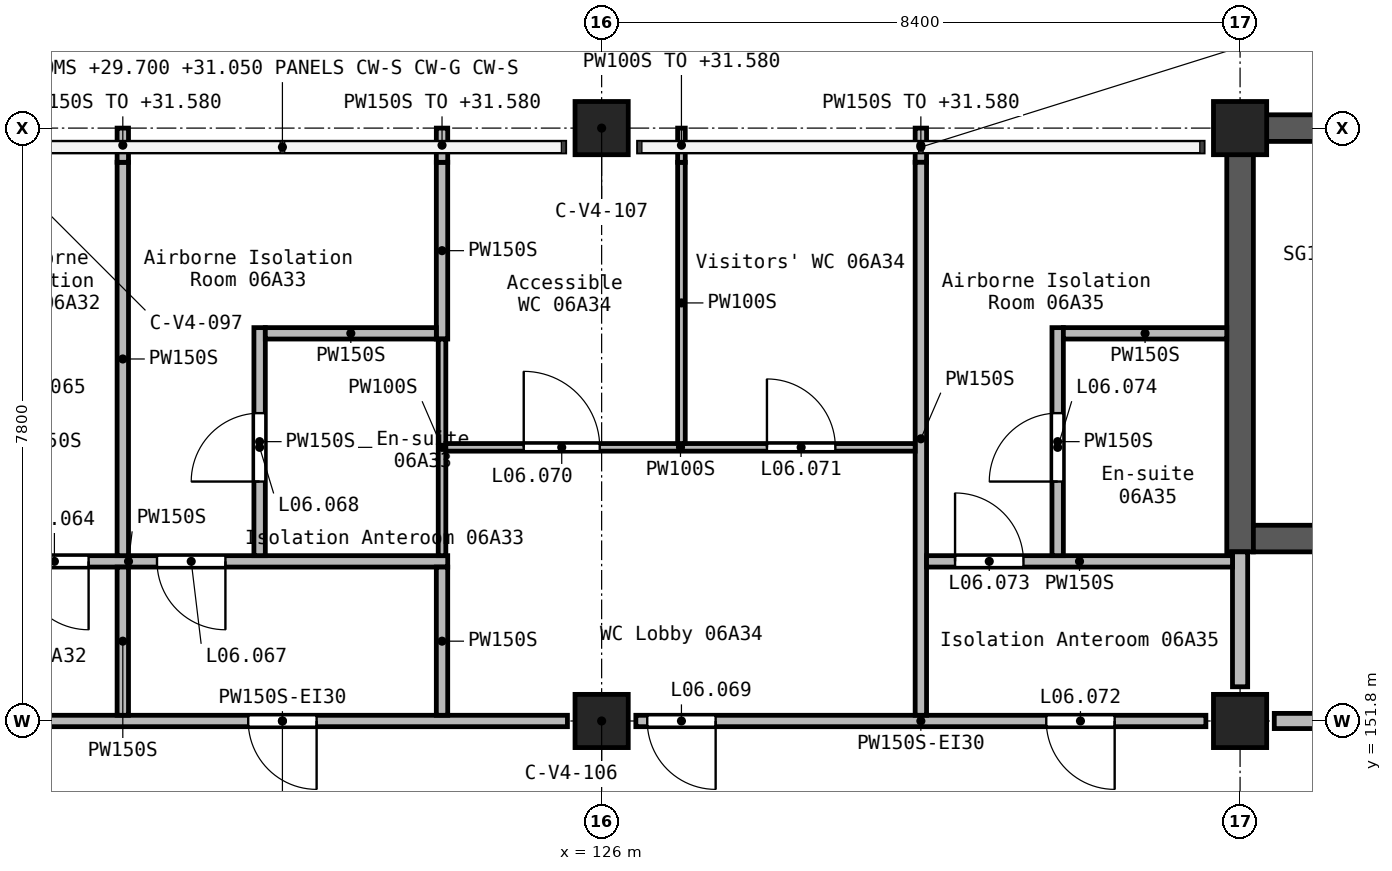
"""IFC4 building model, lengths in metres.
Left out: names, types, materials, properties, quantities, classifications, styles, units other than length and angle.
Written with IfcOpenShell. Run it as: python <this file> out.ifc"""

import sys

from ifc_helpers import new_model, si_unit, direction, frame, frame_2d, origin, origin_2d, place, context, subcontext, project, spatial, rectangle, extrude, element, fill, save


model = new_model("IFC4")
c1 = context("Model", 3, precision=1e-05, world=origin(), true_north=direction((0.0, 1.0)))
c2 = subcontext(c1, "Body", "Model", "MODEL_VIEW")
j1 = project(units=[si_unit("LENGTHUNIT", "METRE"), si_unit("PLANEANGLEUNIT", "RADIAN")], contexts=[c1])
p1 = place(None, origin())
s1 = spatial("IfcSite", under=j1, at=p1, CompositionType="ELEMENT")
p2 = place(p1, origin())
s2 = spatial("IfcBuilding", under=s1, at=p2, CompositionType="ELEMENT")
p3 = place(p2, frame((0.0, 0.0, 28.8)))
s3 = spatial("IfcBuildingStorey", under=s2, at=p3, CompositionType="ELEMENT", Elevation=28.8)
for number, where, z_axis, x_axis in (
    (1, (126.0, 151.8, 0.0), (0.0, 0.0, 1.0), (1.0, 0.0, 0.0)),
    (2, (126.0, 159.6, 0.0), (0.0, 0.0, 1.0), (1.0, 0.0, 0.0)),
    (3, (134.4, 151.8, 0.0), (0.0, 0.0, 1.0), (1.0, 0.0, 0.0)),
    (4, (134.4, 159.6, 0.0), (0.0, 0.0, 1.0), (1.0, 0.0, 0.0)),
):
    element("IfcColumn", number, at=place(p3, frame(where, z_axis=z_axis, x_axis=x_axis)), inside=s3, PredefinedType="COLUMN", context=c2, shape_type="SweptSolid", body=[
        extrude(rectangle(XDim=0.7, YDim=0.7, at=origin_2d()), origin(), (0.0, 0.0, 1.0), 3.9),
    ])
p4 = place(p3, frame((134.225, 159.6, 0.0), z_axis=(0.0, 0.0, 1.0), x_axis=(1.0, 0.0, 0.0)))
e5 = element("IfcWall", 5, at=p4, inside=s3, PredefinedType="SHEAR", context=c2, shape_type="SweptSolid", body=[
    extrude(rectangle(XDim=8.4, YDim=0.35, at=frame_2d((4.2, 0.0))), origin(), (0.0, 0.0, 1.0), 3.9),
])
p5 = place(p3, frame((134.4, 154.025, 0.0), z_axis=(0.0, 0.0, 1.0), x_axis=(0.0, 1.0, 0.0)))
e6 = element("IfcWall", 6, at=p5, inside=s3, PredefinedType="SHEAR", context=c2, shape_type="SweptSolid", body=[
    extrude(rectangle(XDim=5.4, YDim=0.35, at=frame_2d((2.7, 0.0))), origin(), (0.0, 0.0, 1.0), 3.9),
])
p6 = place(p3, frame((134.575, 154.2, 0.0), z_axis=(0.0, 0.0, 1.0), x_axis=(1.0, 0.0, 0.0)))
e7 = element("IfcWall", 7, at=p6, inside=s3, PredefinedType="SHEAR", context=c2, shape_type="SweptSolid", body=[
    extrude(rectangle(XDim=8.05, YDim=0.35, at=frame_2d((4.025, 0.0))), origin(), (0.0, 0.0, 1.0), 3.9),
])
p7 = place(p6, frame((6.525, 0.0, 0.0)))
e8 = element("IfcOpeningElement", 8, at=p7, cuts=e7, PredefinedType="OPENING", context=c2, shape_type="SweptSolid", body=[
    extrude(rectangle(XDim=1.1, YDim=2.1, at=frame_2d((0.55, 1.05))), frame((0.0, 0.185, 0.0), z_axis=(0.0, -1.0, 0.0), x_axis=(1.0, 0.0, 0.0)), (0.0, 0.0, 1.0), 0.37),
])
p8 = place(p3, frame((134.85, 151.8, 0.0), z_axis=(0.0, 0.0, 1.0), x_axis=(1.0, 0.0, 0.0)))
e9 = element("IfcWall", 9, at=p8, inside=s3, PredefinedType="SOLIDWALL", context=c2, shape_type="SweptSolid", body=[
    extrude(rectangle(XDim=7.5, YDim=0.2, at=frame_2d((3.75, 0.0))), origin(), (0.0, 0.0, 1.0), 3.6),
])
p9 = place(p8, frame((3.2, 0.0, 0.0)))
e10 = element("IfcOpeningElement", 10, at=p9, cuts=e9, PredefinedType="OPENING", context=c2, shape_type="SweptSolid", body=[
    extrude(rectangle(XDim=1.1, YDim=2.1, at=frame_2d((0.55, 1.05))), frame((0.0, 0.11, 0.0), z_axis=(0.0, -1.0, 0.0), x_axis=(1.0, 0.0, 0.0)), (0.0, 0.0, 1.0), 0.22),
])
p10 = place(p3, frame((134.4, 152.25, 0.0), z_axis=(0.0, 0.0, 1.0), x_axis=(0.0, 1.0, 0.0)))
e11 = element("IfcWall", 11, at=p10, inside=s3, PredefinedType="SOLIDWALL", context=c2, shape_type="SweptSolid", body=[
    extrude(rectangle(XDim=1.775, YDim=0.2, at=frame_2d((0.887, 0.0))), origin(), (0.0, 0.0, 1.0), 3.6),
])
p11 = place(p3, frame((133.95, 151.8, 0.0), z_axis=(0.0, 0.0, 1.0), x_axis=(-1.0, 0.0, 0.0)))
e12 = element("IfcWall", 12, at=p11, inside=s3, PredefinedType="PARTITIONING", context=c2, shape_type="SweptSolid", body=[
    extrude(rectangle(XDim=7.5, YDim=0.15, at=frame_2d((3.75, 0.0))), origin(), (0.0, 0.0, 1.0), 3.6),
])
p12 = place(p11, frame((6.45, 0.0, 0.0)))
e13 = element("IfcOpeningElement", 13, at=p12, cuts=e12, PredefinedType="OPENING", context=c2, shape_type="SweptSolid", body=[
    extrude(rectangle(XDim=0.9, YDim=2.1, at=frame_2d((0.45, 1.05))), frame((0.0, 0.085, 0.0), z_axis=(0.0, -1.0, 0.0), x_axis=(1.0, 0.0, 0.0)), (0.0, 0.0, 1.0), 0.17),
])
p13 = place(p11, frame((1.2, 0.0, 0.0)))
e14 = element("IfcOpeningElement", 14, at=p13, cuts=e12, PredefinedType="OPENING", context=c2, shape_type="SweptSolid", body=[
    extrude(rectangle(XDim=0.9, YDim=2.1, at=frame_2d((0.45, 1.05))), frame((0.0, 0.085, 0.0), z_axis=(0.0, -1.0, 0.0), x_axis=(1.0, 0.0, 0.0)), (0.0, 0.0, 1.0), 0.17),
])
p14 = place(p3, frame((125.55, 151.8, 0.0), z_axis=(0.0, 0.0, 1.0), x_axis=(-1.0, 0.0, 0.0)))
e15 = element("IfcWall", 15, at=p14, inside=s3, PredefinedType="PARTITIONING", context=c2, shape_type="SweptSolid", body=[
    extrude(rectangle(XDim=7.5, YDim=0.15, at=frame_2d((3.75, 0.0))), origin(), (0.0, 0.0, 1.0), 3.6),
])
p15 = place(p14, frame((3.3, 0.0, 0.0)))
e16 = element("IfcOpeningElement", 16, at=p15, cuts=e15, PredefinedType="OPENING", context=c2, shape_type="SweptSolid", body=[
    extrude(rectangle(XDim=0.9, YDim=2.1, at=frame_2d((0.45, 1.05))), frame((0.0, 0.085, 0.0), z_axis=(0.0, -1.0, 0.0), x_axis=(1.0, 0.0, 0.0)), (0.0, 0.0, 1.0), 0.17),
])
p16 = place(p3, frame((123.975, 153.9, 0.0), z_axis=(0.0, 0.0, 1.0), x_axis=(-1.0, 0.0, 0.0)))
e17 = element("IfcWall", 17, at=p16, inside=s3, PredefinedType="PARTITIONING", context=c2, shape_type="SweptSolid", body=[
    extrude(rectangle(XDim=8.4, YDim=0.15, at=frame_2d((4.2, 0.0))), origin(), (0.0, 0.0, 1.0), 3.6),
])
p17 = place(p16, frame((4.725, 0.0, 0.0)))
e18 = element("IfcOpeningElement", 18, at=p17, cuts=e17, PredefinedType="OPENING", context=c2, shape_type="SweptSolid", body=[
    extrude(rectangle(XDim=0.9, YDim=2.1, at=frame_2d((0.45, 1.05))), frame((0.0, 0.085, 0.0), z_axis=(0.0, -1.0, 0.0), x_axis=(1.0, 0.0, 0.0)), (0.0, 0.0, 1.0), 0.17),
])
p18 = place(p16, frame((2.925, 0.0, 0.0)))
e19 = element("IfcOpeningElement", 19, at=p18, cuts=e17, PredefinedType="OPENING", context=c2, shape_type="SweptSolid", body=[
    extrude(rectangle(XDim=0.9, YDim=2.1, at=frame_2d((0.45, 1.05))), frame((0.0, 0.085, 0.0), z_axis=(0.0, -1.0, 0.0), x_axis=(1.0, 0.0, 0.0)), (0.0, 0.0, 1.0), 0.17),
])
p19 = place(p3, frame((119.7, 151.875, 0.0), z_axis=(0.0, 0.0, 1.0), x_axis=(0.0, 1.0, 0.0)))
e20 = element("IfcWall", 20, at=p19, inside=s3, PredefinedType="PARTITIONING", context=c2, shape_type="SweptSolid", body=[
    extrude(rectangle(XDim=1.95, YDim=0.15, at=frame_2d((0.975, 0.0))), origin(), (0.0, 0.0, 1.0), 3.6),
])
p20 = place(p3, frame((119.7, 153.975, 0.0), z_axis=(0.0, 0.0, 1.0), x_axis=(0.0, 1.0, 0.0)))
e21 = element("IfcWall", 21, at=p20, inside=s3, PredefinedType="PARTITIONING", context=c2, shape_type="SweptSolid", body=[
    extrude(rectangle(XDim=5.175, YDim=0.15, at=frame_2d((2.587, 0.0))), origin(), (0.0, 0.0, 1.0), 3.6),
])
for number, where, z_axis, x_axis in (
    (22, (119.7, 159.15, 0.0), (0.0, 0.0, 1.0), (0.0, 1.0, 0.0)),
    (23, (130.2, 159.6, 0.0), (0.0, 0.0, 1.0), (0.0, -1.0, 0.0)),
):
    element("IfcWall", number, at=place(p3, frame(where, z_axis=z_axis, x_axis=x_axis)), inside=s3, PredefinedType="PARTITIONING", context=c2, shape_type="SweptSolid", body=[
        extrude(rectangle(XDim=0.45, YDim=0.15, at=frame_2d((0.225, 0.0))), origin(), (0.0, 0.0, 1.0), 2.78),
    ])
p21 = place(p3, frame((130.2, 159.15, 0.0), z_axis=(0.0, 0.0, 1.0), x_axis=(0.0, -1.0, 0.0)))
e24 = element("IfcWall", 24, at=p21, inside=s3, PredefinedType="PARTITIONING", context=c2, shape_type="SweptSolid", body=[
    extrude(rectangle(XDim=7.275, YDim=0.15, at=frame_2d((3.637, 0.0))), origin(), (0.0, 0.0, 1.0), 3.6),
])
p22 = place(p3, frame((130.275, 153.9, 0.0), z_axis=(0.0, 0.0, 1.0), x_axis=(1.0, 0.0, 0.0)))
e25 = element("IfcWall", 25, at=p22, inside=s3, PredefinedType="PARTITIONING", context=c2, shape_type="SweptSolid", body=[
    extrude(rectangle(XDim=4.025, YDim=0.15, at=frame_2d((2.013, 0.0))), origin(), (0.0, 0.0, 1.0), 3.6),
])
p23 = place(p22, frame((0.375, 0.0, 0.0)))
e26 = element("IfcOpeningElement", 26, at=p23, cuts=e25, PredefinedType="OPENING", context=c2, shape_type="SweptSolid", body=[
    extrude(rectangle(XDim=0.9, YDim=2.1, at=frame_2d((0.45, 1.05))), frame((0.0, 0.085, 0.0), z_axis=(0.0, -1.0, 0.0), x_axis=(1.0, 0.0, 0.0)), (0.0, 0.0, 1.0), 0.17),
])
p24 = place(p3, frame((121.5, 153.975, 0.0), z_axis=(0.0, 0.0, 1.0), x_axis=(0.0, 1.0, 0.0)))
e27 = element("IfcWall", 27, at=p24, inside=s3, PredefinedType="PARTITIONING", context=c2, shape_type="SweptSolid", body=[
    extrude(rectangle(XDim=3.0, YDim=0.15, at=frame_2d((1.5, 0.0))), origin(), (0.0, 0.0, 1.0), 3.6),
])
p25 = place(p24, frame((0.975, 0.0, 0.0)))
e28 = element("IfcOpeningElement", 28, at=p25, cuts=e27, PredefinedType="OPENING", context=c2, shape_type="SweptSolid", body=[
    extrude(rectangle(XDim=0.9, YDim=2.1, at=frame_2d((0.45, 1.05))), frame((0.0, 0.085, 0.0), z_axis=(0.0, -1.0, 0.0), x_axis=(1.0, 0.0, 0.0)), (0.0, 0.0, 1.0), 0.17),
])
p26 = place(p3, frame((132.0, 153.975, 0.0), z_axis=(0.0, 0.0, 1.0), x_axis=(0.0, 1.0, 0.0)))
e29 = element("IfcWall", 29, at=p26, inside=s3, PredefinedType="PARTITIONING", context=c2, shape_type="SweptSolid", body=[
    extrude(rectangle(XDim=3.0, YDim=0.15, at=frame_2d((1.5, 0.0))), origin(), (0.0, 0.0, 1.0), 3.6),
])
p27 = place(p26, frame((0.975, 0.0, 0.0)))
e30 = element("IfcOpeningElement", 30, at=p27, cuts=e29, PredefinedType="OPENING", context=c2, shape_type="SweptSolid", body=[
    extrude(rectangle(XDim=0.9, YDim=2.1, at=frame_2d((0.45, 1.05))), frame((0.0, 0.085, 0.0), z_axis=(0.0, -1.0, 0.0), x_axis=(1.0, 0.0, 0.0)), (0.0, 0.0, 1.0), 0.17),
])
p28 = place(p3, frame((123.9, 156.825, 0.0), z_axis=(0.0, 0.0, 1.0), x_axis=(0.0, 1.0, 0.0)))
e31 = element("IfcWall", 31, at=p28, inside=s3, PredefinedType="PARTITIONING", context=c2, shape_type="SweptSolid", body=[
    extrude(rectangle(XDim=2.325, YDim=0.15, at=frame_2d((1.163, 0.0))), origin(), (0.0, 0.0, 1.0), 3.6),
])
p29 = place(p3, frame((123.9, 159.15, 0.0), z_axis=(0.0, 0.0, 1.0), x_axis=(0.0, 1.0, 0.0)))
e32 = element("IfcWall", 32, at=p29, inside=s3, PredefinedType="PARTITIONING", context=c2, shape_type="SweptSolid", body=[
    extrude(rectangle(XDim=0.45, YDim=0.15, at=frame_2d((0.225, 0.0))), origin(), (0.0, 0.0, 1.0), 2.78),
])
p30 = place(p3, frame((121.575, 156.9, 0.0), z_axis=(0.0, 0.0, 1.0), x_axis=(1.0, 0.0, 0.0)))
e33 = element("IfcWall", 33, at=p30, inside=s3, PredefinedType="PARTITIONING", context=c2, shape_type="SweptSolid", body=[
    extrude(rectangle(XDim=2.25, YDim=0.15, at=frame_2d((1.125, 0.0))), origin(), (0.0, 0.0, 1.0), 3.6),
])
p31 = place(p3, frame((132.075, 156.9, 0.0), z_axis=(0.0, 0.0, 1.0), x_axis=(1.0, 0.0, 0.0)))
e34 = element("IfcWall", 34, at=p31, inside=s3, PredefinedType="PARTITIONING", context=c2, shape_type="SweptSolid", body=[
    extrude(rectangle(XDim=2.15, YDim=0.15, at=frame_2d((1.075, 0.0))), origin(), (0.0, 0.0, 1.0), 3.6),
])
p32 = place(p3, frame((123.9, 151.875, 0.0), z_axis=(0.0, 0.0, 1.0), x_axis=(0.0, 1.0, 0.0)))
e35 = element("IfcWall", 35, at=p32, inside=s3, PredefinedType="PARTITIONING", context=c2, shape_type="SweptSolid", body=[
    extrude(rectangle(XDim=1.95, YDim=0.15, at=frame_2d((0.975, 0.0))), origin(), (0.0, 0.0, 1.0), 3.6),
])
p33 = place(p3, frame((123.9, 153.975, 0.0), z_axis=(0.0, 0.0, 1.0), x_axis=(0.0, 1.0, 0.0)))
e36 = element("IfcWall", 36, at=p33, inside=s3, PredefinedType="PARTITIONING", context=c2, shape_type="SweptSolid", body=[
    extrude(rectangle(XDim=2.85, YDim=0.1, at=frame_2d((1.425, 0.0))), origin(), (0.0, 0.0, 1.0), 3.6),
])
p34 = place(p3, frame((123.95, 155.4, 0.0), z_axis=(0.0, 0.0, 1.0), x_axis=(1.0, 0.0, 0.0)))
e37 = element("IfcWall", 37, at=p34, inside=s3, PredefinedType="PARTITIONING", context=c2, shape_type="SweptSolid", body=[
    extrude(rectangle(XDim=6.175, YDim=0.1, at=frame_2d((3.087, 0.0))), origin(), (0.0, 0.0, 1.0), 3.6),
])
p35 = place(p34, frame((1.025, 0.0, 0.0)))
e38 = element("IfcOpeningElement", 38, at=p35, cuts=e37, PredefinedType="OPENING", context=c2, shape_type="SweptSolid", body=[
    extrude(rectangle(XDim=1.0, YDim=2.1, at=frame_2d((0.5, 1.05))), frame((0.0, 0.06, 0.0), z_axis=(0.0, -1.0, 0.0), x_axis=(1.0, 0.0, 0.0)), (0.0, 0.0, 1.0), 0.12),
])
p36 = place(p34, frame((4.225, 0.0, 0.0)))
e39 = element("IfcOpeningElement", 39, at=p36, cuts=e37, PredefinedType="OPENING", context=c2, shape_type="SweptSolid", body=[
    extrude(rectangle(XDim=0.9, YDim=2.1, at=frame_2d((0.45, 1.05))), frame((0.0, 0.06, 0.0), z_axis=(0.0, -1.0, 0.0), x_axis=(1.0, 0.0, 0.0)), (0.0, 0.0, 1.0), 0.12),
])
p37 = place(p3, frame((127.05, 155.45, 0.0), z_axis=(0.0, 0.0, 1.0), x_axis=(0.0, 1.0, 0.0)))
e40 = element("IfcWall", 40, at=p37, inside=s3, PredefinedType="PARTITIONING", context=c2, shape_type="SweptSolid", body=[
    extrude(rectangle(XDim=3.7, YDim=0.1, at=frame_2d((1.85, 0.0))), origin(), (0.0, 0.0, 1.0), 3.6),
])
p38 = place(p3, frame((127.05, 159.15, 0.0), z_axis=(0.0, 0.0, 1.0), x_axis=(0.0, 1.0, 0.0)))
e41 = element("IfcWall", 41, at=p38, inside=s3, PredefinedType="PARTITIONING", context=c2, shape_type="SweptSolid", body=[
    extrude(rectangle(XDim=0.45, YDim=0.1, at=frame_2d((0.225, 0.0))), origin(), (0.0, 0.0, 1.0), 2.78),
])
p39 = place(p17, frame((0.9, 0.0, 0.0), z_axis=(0.0, 0.0, 1.0), x_axis=(-1.0, 0.0, 0.0)))
e42 = element("IfcDoor", 42, at=p39, inside=s3, OperationType="SINGLE_SWING_LEFT", PredefinedType="DOOR", context=c2, shape_type="SweptSolid", body=[
    extrude(rectangle(XDim=0.9, YDim=2.1, at=frame_2d((0.45, 1.05))), frame((0.0, 0.025, 0.0), z_axis=(0.0, -1.0, 0.0), x_axis=(1.0, 0.0, 0.0)), (0.0, 0.0, 1.0), 0.05),
])
fill(e18, e42)
p40 = place(p15, frame((0.9, 0.0, 0.0), z_axis=(0.0, 0.0, 1.0), x_axis=(-1.0, 0.0, 0.0)))
e43 = element("IfcDoor", 43, at=p40, inside=s3, OperationType="SINGLE_SWING_RIGHT", PredefinedType="DOOR", context=c2, shape_type="SweptSolid", body=[
    extrude(rectangle(XDim=0.9, YDim=2.1, at=frame_2d((0.45, 1.05))), frame((0.0, 0.025, 0.0), z_axis=(0.0, -1.0, 0.0), x_axis=(1.0, 0.0, 0.0)), (0.0, 0.0, 1.0), 0.05),
])
fill(e16, e43)
p41 = place(p18, frame((0.9, 0.0, 0.0), z_axis=(0.0, 0.0, 1.0), x_axis=(-1.0, 0.0, 0.0)))
e44 = element("IfcDoor", 44, at=p41, inside=s3, OperationType="SINGLE_SWING_RIGHT", PredefinedType="DOOR", context=c2, shape_type="SweptSolid", body=[
    extrude(rectangle(XDim=0.9, YDim=2.1, at=frame_2d((0.45, 1.05))), frame((0.0, 0.025, 0.0), z_axis=(0.0, -1.0, 0.0), x_axis=(1.0, 0.0, 0.0)), (0.0, 0.0, 1.0), 0.05),
])
fill(e19, e44)
p42 = place(p25, frame((0.9, 0.0, 0.0), z_axis=(0.0, 0.0, 1.0), x_axis=(-1.0, 0.0, 0.0)))
e45 = element("IfcDoor", 45, at=p42, inside=s3, OperationType="SINGLE_SWING_RIGHT", PredefinedType="DOOR", context=c2, shape_type="SweptSolid", body=[
    extrude(rectangle(XDim=0.9, YDim=2.1, at=frame_2d((0.45, 1.05))), frame((0.0, 0.025, 0.0), z_axis=(0.0, -1.0, 0.0), x_axis=(1.0, 0.0, 0.0)), (0.0, 0.0, 1.0), 0.05),
])
fill(e28, e45)
p43 = place(p12, frame((0.9, 0.0, 0.0), z_axis=(0.0, 0.0, 1.0), x_axis=(-1.0, 0.0, 0.0)))
e46 = element("IfcDoor", 46, at=p43, inside=s3, OperationType="SINGLE_SWING_LEFT", PredefinedType="DOOR", context=c2, shape_type="SweptSolid", body=[
    extrude(rectangle(XDim=0.9, YDim=2.1, at=frame_2d((0.45, 1.05))), frame((0.0, 0.025, 0.0), z_axis=(0.0, -1.0, 0.0), x_axis=(1.0, 0.0, 0.0)), (0.0, 0.0, 1.0), 0.05),
])
fill(e13, e46)
p44 = place(p35, origin())
e47 = element("IfcDoor", 47, at=p44, inside=s3, OperationType="SINGLE_SWING_LEFT", PredefinedType="DOOR", context=c2, shape_type="SweptSolid", body=[
    extrude(rectangle(XDim=1.0, YDim=2.1, at=frame_2d((0.5, 1.05))), frame((0.0, 0.025, 0.0), z_axis=(0.0, -1.0, 0.0), x_axis=(1.0, 0.0, 0.0)), (0.0, 0.0, 1.0), 0.05),
])
fill(e38, e47)
p45 = place(p36, origin())
e48 = element("IfcDoor", 48, at=p45, inside=s3, OperationType="SINGLE_SWING_RIGHT", PredefinedType="DOOR", context=c2, shape_type="SweptSolid", body=[
    extrude(rectangle(XDim=0.9, YDim=2.1, at=frame_2d((0.45, 1.05))), frame((0.0, 0.025, 0.0), z_axis=(0.0, -1.0, 0.0), x_axis=(1.0, 0.0, 0.0)), (0.0, 0.0, 1.0), 0.05),
])
fill(e39, e48)
p46 = place(p13, frame((0.9, 0.0, 0.0), z_axis=(0.0, 0.0, 1.0), x_axis=(-1.0, 0.0, 0.0)))
e49 = element("IfcDoor", 49, at=p46, inside=s3, OperationType="SINGLE_SWING_RIGHT", PredefinedType="DOOR", context=c2, shape_type="SweptSolid", body=[
    extrude(rectangle(XDim=0.9, YDim=2.1, at=frame_2d((0.45, 1.05))), frame((0.0, 0.025, 0.0), z_axis=(0.0, -1.0, 0.0), x_axis=(1.0, 0.0, 0.0)), (0.0, 0.0, 1.0), 0.05),
])
fill(e14, e49)
p47 = place(p23, origin())
e50 = element("IfcDoor", 50, at=p47, inside=s3, OperationType="SINGLE_SWING_LEFT", PredefinedType="DOOR", context=c2, shape_type="SweptSolid", body=[
    extrude(rectangle(XDim=0.9, YDim=2.1, at=frame_2d((0.45, 1.05))), frame((0.0, 0.025, 0.0), z_axis=(0.0, -1.0, 0.0), x_axis=(1.0, 0.0, 0.0)), (0.0, 0.0, 1.0), 0.05),
])
fill(e26, e50)
p48 = place(p27, frame((0.9, 0.0, 0.0), z_axis=(0.0, 0.0, 1.0), x_axis=(-1.0, 0.0, 0.0)))
e51 = element("IfcDoor", 51, at=p48, inside=s3, OperationType="SINGLE_SWING_RIGHT", PredefinedType="DOOR", context=c2, shape_type="SweptSolid", body=[
    extrude(rectangle(XDim=0.9, YDim=2.1, at=frame_2d((0.45, 1.05))), frame((0.0, 0.025, 0.0), z_axis=(0.0, -1.0, 0.0), x_axis=(1.0, 0.0, 0.0)), (0.0, 0.0, 1.0), 0.05),
])
fill(e30, e51)
save(model, sys.argv[1])
